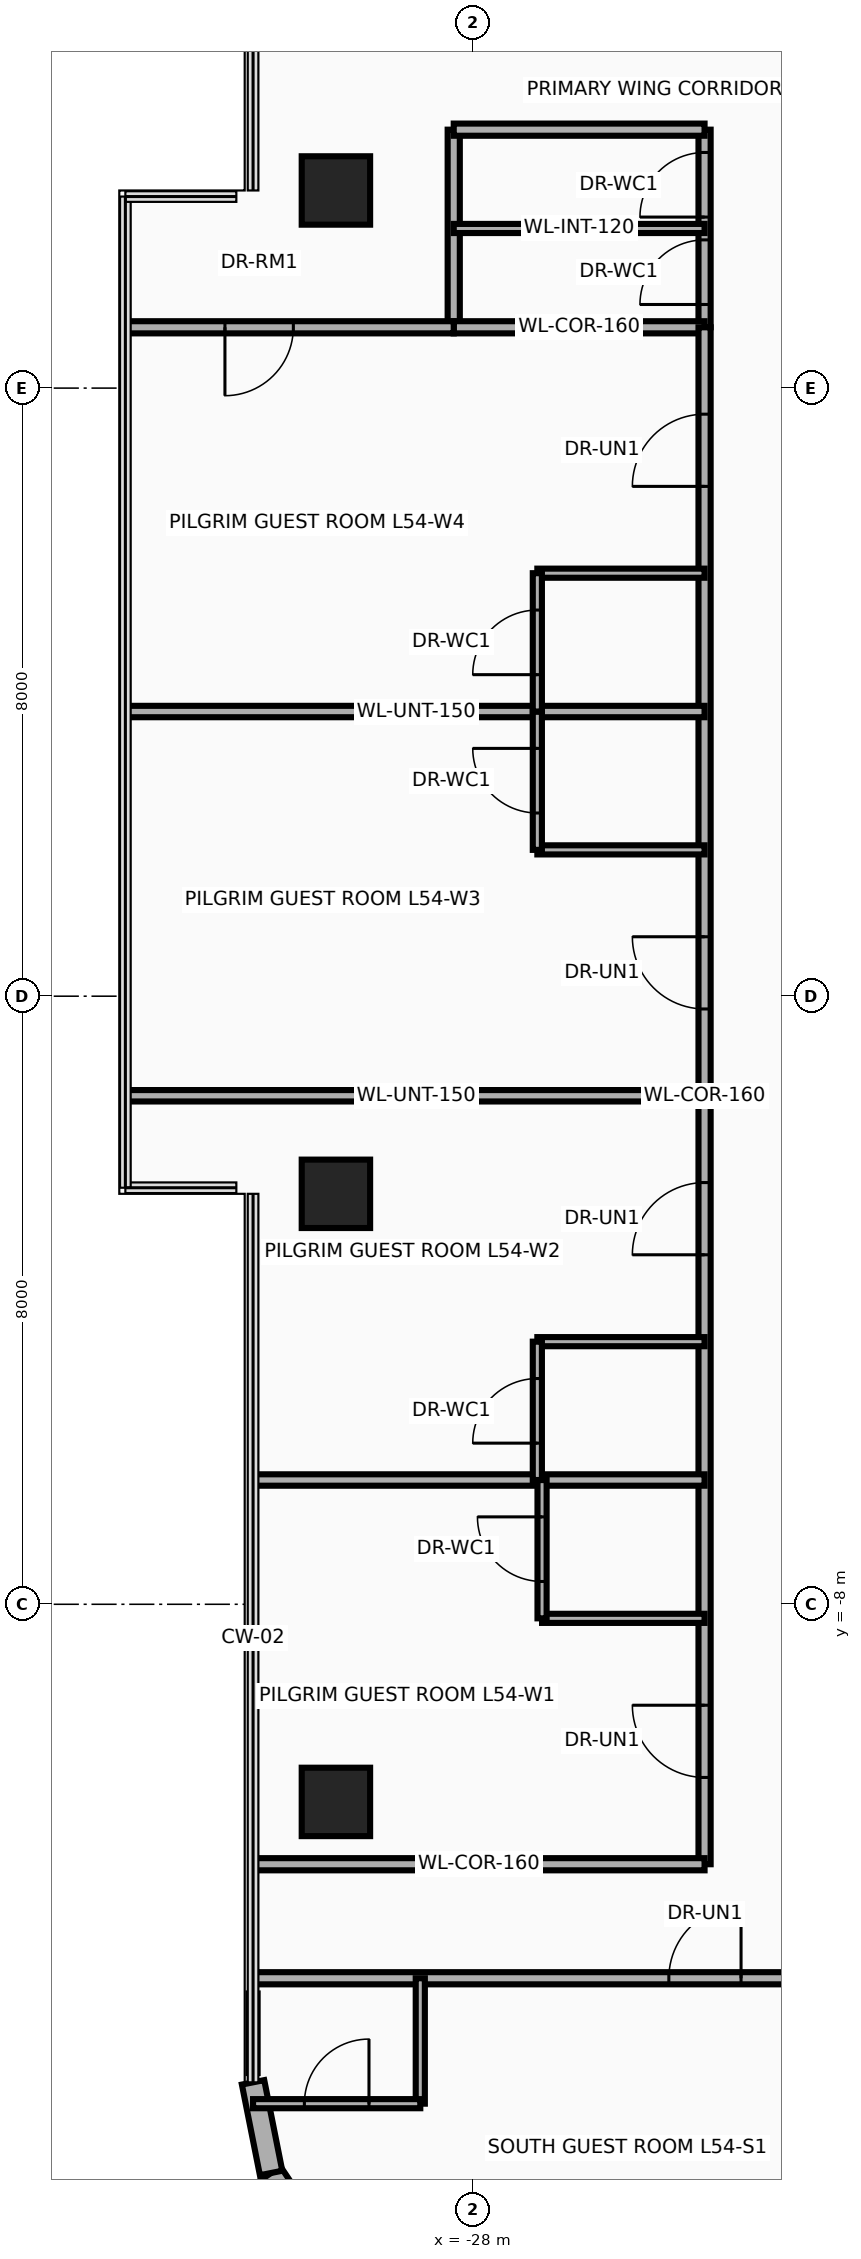
"""IFC4 building model, lengths in metres.
Left out: names, types, materials, properties, quantities, classifications, styles, units other than length and angle.
Written with IfcOpenShell. Run it as: python <this file> out.ifc"""

import sys

from ifc_helpers import new_model, si_unit, direction, frame, frame_2d, origin, origin_2d, place, context, subcontext, project, spatial, rectangle, extrude, source, transform, mapped, element, fill, save


model = new_model("IFC4")
c1 = context("Model", 3, precision=1e-05, world=origin(), true_north=direction((0.0, 1.0)))
c2 = subcontext(c1, "Body", "Model", "MODEL_VIEW")
j1 = project(units=[si_unit("LENGTHUNIT", "METRE"), si_unit("PLANEANGLEUNIT", "RADIAN")], contexts=[c1])
p1 = place(None, origin())
s1 = spatial("IfcSite", under=j1, at=p1, CompositionType="ELEMENT")
p2 = place(p1, origin())
s2 = spatial("IfcBuilding", under=s1, at=p2, CompositionType="ELEMENT")
p3 = place(p2, frame((0.0, 0.0, 212.5)))
s3 = spatial("IfcBuildingStorey", under=s2, at=p3, CompositionType="ELEMENT", Elevation=212.5)
m1 = source(origin(), c2, "Body", "SweptSolid", [
    extrude(rectangle(XDim=0.9, YDim=0.9, at=origin_2d()), origin(), (0.0, 0.0, 1.0), 3.5),
])
for number, where, z_axis, x_axis in (
    (1, (-29.8, -10.6, 0.0), (0.0, 0.0, 1.0), (1.0, 0.0, 0.0)),
    (2, (-29.8, -2.6, 0.0), (0.0, 0.0, 1.0), (1.0, 0.0, 0.0)),
    (3, (-29.8, 10.6, 0.0), (0.0, 0.0, 1.0), (1.0, 0.0, 0.0)),
):
    element("IfcColumn", number, at=place(p3, frame(where, z_axis=z_axis, x_axis=x_axis)), inside=s3, PredefinedType="COLUMN", context=c2, shape_type="MappedRepresentation", body=[
        mapped(m1, transform((0.0, 0.0, 0.0), x_axis=(1.0, 0.0, 0.0), y_axis=(0.0, 1.0, 0.0), z_axis=(0.0, 0.0, 1.0), scale=1.0)),
    ])
p4 = place(p3, frame((-29.983, -16.483, 0.0), z_axis=(0.0, 0.0, 1.0), x_axis=(-0.555635100982, 0.831426265255, 0.0)))
e4 = element("IfcWall", 4, at=p4, inside=s3, PredefinedType="SOLIDWALL", context=c2, shape_type="SweptSolid", body=[
    extrude(rectangle(XDim=1.205, YDim=0.3, at=frame_2d((0.603, 0.0))), origin(), (0.0, 0.0, 1.0), 3.26),
])
p5 = place(p3, frame((-30.653, -15.482, 0.0), z_axis=(0.0, 0.0, 1.0), x_axis=(-0.194996050505, 0.980804027463, 0.0)))
e5 = element("IfcWall", 5, at=p5, inside=s3, PredefinedType="SOLIDWALL", context=c2, shape_type="SweptSolid", body=[
    extrude(rectangle(XDim=1.216, YDim=0.3, at=frame_2d((0.608, 0.0))), origin(), (0.0, 0.0, 1.0), 3.26),
])
p6 = place(p3, frame((-28.25, 8.8, 0.0), z_axis=(0.0, 0.0, 1.0), x_axis=(0.0, 1.0, 0.0)))
e6 = element("IfcWall", 6, at=p6, inside=s3, PredefinedType="PARTITIONING", context=c2, shape_type="SweptSolid", body=[
    extrude(rectangle(XDim=2.6, YDim=0.16, at=frame_2d((1.3, 0.0))), origin(), (0.0, 0.0, 1.0), 2.544),
])
p7 = place(p3, frame((-24.95, 8.8, 0.0), z_axis=(0.0, 0.0, 1.0), x_axis=(0.0, 1.0, 0.0)))
e7 = element("IfcWall", 7, at=p7, inside=s3, PredefinedType="PARTITIONING", context=c2, shape_type="SweptSolid", body=[
    extrude(rectangle(XDim=2.6, YDim=0.16, at=frame_2d((1.3, 0.0))), origin(), (0.0, 0.0, 1.0), 2.544),
])
p8 = place(p7, frame((0.3, 0.0, 0.0)))
e8 = element("IfcOpeningElement", 8, at=p8, cuts=e7, PredefinedType="OPENING", context=c2, shape_type="SweptSolid", body=[
    extrude(rectangle(XDim=0.85, YDim=2.1, at=frame_2d((0.425, 1.05))), frame((0.0, 0.095, 0.0), z_axis=(0.0, -1.0, 0.0), x_axis=(1.0, 0.0, 0.0)), (0.0, 0.0, 1.0), 0.19),
])
p9 = place(p7, frame((1.45, 0.0, 0.0)))
e9 = element("IfcOpeningElement", 9, at=p9, cuts=e7, PredefinedType="OPENING", context=c2, shape_type="SweptSolid", body=[
    extrude(rectangle(XDim=0.85, YDim=2.1, at=frame_2d((0.425, 1.05))), frame((0.0, 0.095, 0.0), z_axis=(0.0, -1.0, 0.0), x_axis=(1.0, 0.0, 0.0)), (0.0, 0.0, 1.0), 0.19),
])
for number, where, z_axis, x_axis in (
    (10, (-28.25, 8.8, 0.0), (0.0, 0.0, 1.0), (1.0, 0.0, 0.0)),
    (11, (-28.25, 11.4, 0.0), (0.0, 0.0, 1.0), (1.0, 0.0, 0.0)),
):
    element("IfcWall", number, at=place(p3, frame(where, z_axis=z_axis, x_axis=x_axis)), inside=s3, PredefinedType="PARTITIONING", context=c2, shape_type="SweptSolid", body=[
        extrude(rectangle(XDim=3.3, YDim=0.16, at=frame_2d((1.65, 0.0))), origin(), (0.0, 0.0, 1.0), 3.26),
    ])
p10 = place(p3, frame((-28.25, 10.1, 0.0), z_axis=(0.0, 0.0, 1.0), x_axis=(1.0, 0.0, 0.0)))
e12 = element("IfcWall", 12, at=p10, inside=s3, PredefinedType="PARTITIONING", context=c2, shape_type="SweptSolid", body=[
    extrude(rectangle(XDim=3.3, YDim=0.12, at=frame_2d((1.65, 0.0))), origin(), (0.0, 0.0, 1.0), 3.26),
])
p11 = place(p3, frame((-24.95, -11.42, 0.0), z_axis=(0.0, 0.0, 1.0), x_axis=(0.0, 1.0, 0.0)))
e13 = element("IfcWall", 13, at=p11, inside=s3, PredefinedType="PARTITIONING", context=c2, shape_type="SweptSolid", body=[
    extrude(rectangle(XDim=20.22, YDim=0.16, at=frame_2d((10.11, 0.0))), origin(), (0.0, 0.0, 1.0), 2.544),
])
p12 = place(p11, frame((1.142, 0.0, 0.0)))
e14 = element("IfcOpeningElement", 14, at=p12, cuts=e13, PredefinedType="OPENING", context=c2, shape_type="SweptSolid", body=[
    extrude(rectangle(XDim=0.95, YDim=2.15, at=frame_2d((0.475, 1.075))), frame((0.0, 0.095, 0.0), z_axis=(0.0, -1.0, 0.0), x_axis=(1.0, 0.0, 0.0)), (0.0, 0.0, 1.0), 0.19),
])
p13 = place(p11, frame((8.018, 0.0, 0.0)))
e15 = element("IfcOpeningElement", 15, at=p13, cuts=e13, PredefinedType="OPENING", context=c2, shape_type="SweptSolid", body=[
    extrude(rectangle(XDim=0.95, YDim=2.15, at=frame_2d((0.475, 1.075))), frame((0.0, 0.095, 0.0), z_axis=(0.0, -1.0, 0.0), x_axis=(1.0, 0.0, 0.0)), (0.0, 0.0, 1.0), 0.19),
])
p14 = place(p11, frame((11.252, 0.0, 0.0)))
e16 = element("IfcOpeningElement", 16, at=p14, cuts=e13, PredefinedType="OPENING", context=c2, shape_type="SweptSolid", body=[
    extrude(rectangle(XDim=0.95, YDim=2.15, at=frame_2d((0.475, 1.075))), frame((0.0, 0.095, 0.0), z_axis=(0.0, -1.0, 0.0), x_axis=(1.0, 0.0, 0.0)), (0.0, 0.0, 1.0), 0.19),
])
p15 = place(p11, frame((18.127, 0.0, 0.0)))
e17 = element("IfcOpeningElement", 17, at=p15, cuts=e13, PredefinedType="OPENING", context=c2, shape_type="SweptSolid", body=[
    extrude(rectangle(XDim=0.95, YDim=2.15, at=frame_2d((0.475, 1.075))), frame((0.0, 0.095, 0.0), z_axis=(0.0, -1.0, 0.0), x_axis=(1.0, 0.0, 0.0)), (0.0, 0.0, 1.0), 0.19),
])
p16 = place(p3, frame((-32.54, 8.8, 0.0), z_axis=(0.0, 0.0, 1.0), x_axis=(1.0, 0.0, 0.0)))
e18 = element("IfcWall", 18, at=p16, inside=s3, PredefinedType="PARTITIONING", context=c2, shape_type="SweptSolid", body=[
    extrude(rectangle(XDim=4.29, YDim=0.16, at=frame_2d((2.145, 0.0))), origin(), (0.0, 0.0, 1.0), 2.706),
])
p17 = place(p16, frame((1.28, 0.0, 0.0)))
e19 = element("IfcOpeningElement", 19, at=p17, cuts=e18, PredefinedType="OPENING", context=c2, shape_type="SweptSolid", body=[
    extrude(rectangle(XDim=0.9, YDim=2.1, at=frame_2d((0.45, 1.05))), frame((0.0, 0.095, 0.0), z_axis=(0.0, -1.0, 0.0), x_axis=(1.0, 0.0, 0.0)), (0.0, 0.0, 1.0), 0.19),
])
p18 = place(p3, frame((-30.89, -6.365, 0.0), z_axis=(0.0, 0.0, 1.0), x_axis=(1.0, 0.0, 0.0)))
e20 = element("IfcWall", 20, at=p18, inside=s3, PredefinedType="PARTITIONING", context=c2, shape_type="SweptSolid", body=[
    extrude(rectangle(XDim=5.94, YDim=0.15, at=frame_2d((2.97, 0.0))), origin(), (0.0, 0.0, 1.0), 2.706),
])
for number, where, z_axis, x_axis in (
    (21, (-32.54, -1.31, 0.0), (0.0, 0.0, 1.0), (1.0, 0.0, 0.0)),
    (22, (-32.54, 3.745, 0.0), (0.0, 0.0, 1.0), (1.0, 0.0, 0.0)),
):
    element("IfcWall", number, at=place(p3, frame(where, z_axis=z_axis, x_axis=x_axis)), inside=s3, PredefinedType="PARTITIONING", context=c2, shape_type="SweptSolid", body=[
        extrude(rectangle(XDim=7.59, YDim=0.15, at=frame_2d((3.795, 0.0))), origin(), (0.0, 0.0, 1.0), 2.706),
    ])
p19 = place(p3, frame((-27.088, -8.185, 0.0), z_axis=(0.0, 0.0, 1.0), x_axis=(1.0, 0.0, 0.0)))
e23 = element("IfcWall", 23, at=p19, inside=s3, PredefinedType="PARTITIONING", context=c2, shape_type="SweptSolid", body=[
    extrude(rectangle(XDim=2.138, YDim=0.12, at=frame_2d((1.069, 0.0))), origin(), (0.0, 0.0, 1.0), 3.26),
])
p20 = place(p3, frame((-27.088, -8.185, 0.0), z_axis=(0.0, 0.0, 1.0), x_axis=(0.0, 1.0, 0.0)))
e24 = element("IfcWall", 24, at=p20, inside=s3, PredefinedType="PARTITIONING", context=c2, shape_type="SweptSolid", body=[
    extrude(rectangle(XDim=1.82, YDim=0.12, at=frame_2d((0.91, 0.0))), origin(), (0.0, 0.0, 1.0), 2.788),
])
p21 = place(p20, frame((0.485, 0.0, 0.0)))
e25 = element("IfcOpeningElement", 25, at=p21, cuts=e24, PredefinedType="OPENING", context=c2, shape_type="SweptSolid", body=[
    extrude(rectangle(XDim=0.85, YDim=2.1, at=frame_2d((0.425, 1.05))), frame((0.0, 0.075, 0.0), z_axis=(0.0, -1.0, 0.0), x_axis=(1.0, 0.0, 0.0)), (0.0, 0.0, 1.0), 0.15),
])
p22 = place(p3, frame((-27.15, -4.545, 0.0), z_axis=(0.0, 0.0, 1.0), x_axis=(1.0, 0.0, 0.0)))
e26 = element("IfcWall", 26, at=p22, inside=s3, PredefinedType="PARTITIONING", context=c2, shape_type="SweptSolid", body=[
    extrude(rectangle(XDim=2.2, YDim=0.12, at=frame_2d((1.1, 0.0))), origin(), (0.0, 0.0, 1.0), 2.788),
])
p23 = place(p3, frame((-27.15, -6.365, 0.0), z_axis=(0.0, 0.0, 1.0), x_axis=(0.0, 1.0, 0.0)))
e27 = element("IfcWall", 27, at=p23, inside=s3, PredefinedType="PARTITIONING", context=c2, shape_type="SweptSolid", body=[
    extrude(rectangle(XDim=1.82, YDim=0.12, at=frame_2d((0.91, 0.0))), origin(), (0.0, 0.0, 1.0), 2.788),
])
p24 = place(p23, frame((0.485, 0.0, 0.0)))
e28 = element("IfcOpeningElement", 28, at=p24, cuts=e27, PredefinedType="OPENING", context=c2, shape_type="SweptSolid", body=[
    extrude(rectangle(XDim=0.85, YDim=2.1, at=frame_2d((0.425, 1.05))), frame((0.0, 0.075, 0.0), z_axis=(0.0, -1.0, 0.0), x_axis=(1.0, 0.0, 0.0)), (0.0, 0.0, 1.0), 0.15),
])
p25 = place(p3, frame((-27.15, 1.925, 0.0), z_axis=(0.0, 0.0, 1.0), x_axis=(1.0, 0.0, 0.0)))
e29 = element("IfcWall", 29, at=p25, inside=s3, PredefinedType="PARTITIONING", context=c2, shape_type="SweptSolid", body=[
    extrude(rectangle(XDim=2.2, YDim=0.12, at=frame_2d((1.1, 0.0))), origin(), (0.0, 0.0, 1.0), 3.26),
])
p26 = place(p3, frame((-27.15, 1.925, 0.0), z_axis=(0.0, 0.0, 1.0), x_axis=(0.0, 1.0, 0.0)))
e30 = element("IfcWall", 30, at=p26, inside=s3, PredefinedType="PARTITIONING", context=c2, shape_type="SweptSolid", body=[
    extrude(rectangle(XDim=1.82, YDim=0.12, at=frame_2d((0.91, 0.0))), origin(), (0.0, 0.0, 1.0), 2.788),
])
p27 = place(p26, frame((0.485, 0.0, 0.0)))
e31 = element("IfcOpeningElement", 31, at=p27, cuts=e30, PredefinedType="OPENING", context=c2, shape_type="SweptSolid", body=[
    extrude(rectangle(XDim=0.85, YDim=2.1, at=frame_2d((0.425, 1.05))), frame((0.0, 0.075, 0.0), z_axis=(0.0, -1.0, 0.0), x_axis=(1.0, 0.0, 0.0)), (0.0, 0.0, 1.0), 0.15),
])
p28 = place(p3, frame((-27.15, 5.565, 0.0), z_axis=(0.0, 0.0, 1.0), x_axis=(1.0, 0.0, 0.0)))
e32 = element("IfcWall", 32, at=p28, inside=s3, PredefinedType="PARTITIONING", context=c2, shape_type="SweptSolid", body=[
    extrude(rectangle(XDim=2.2, YDim=0.12, at=frame_2d((1.1, 0.0))), origin(), (0.0, 0.0, 1.0), 3.26),
])
p29 = place(p3, frame((-27.15, 3.745, 0.0), z_axis=(0.0, 0.0, 1.0), x_axis=(0.0, 1.0, 0.0)))
e33 = element("IfcWall", 33, at=p29, inside=s3, PredefinedType="PARTITIONING", context=c2, shape_type="SweptSolid", body=[
    extrude(rectangle(XDim=1.82, YDim=0.12, at=frame_2d((0.91, 0.0))), origin(), (0.0, 0.0, 1.0), 2.788),
])
p30 = place(p29, frame((0.485, 0.0, 0.0)))
e34 = element("IfcOpeningElement", 34, at=p30, cuts=e33, PredefinedType="OPENING", context=c2, shape_type="SweptSolid", body=[
    extrude(rectangle(XDim=0.85, YDim=2.1, at=frame_2d((0.425, 1.05))), frame((0.0, 0.075, 0.0), z_axis=(0.0, -1.0, 0.0), x_axis=(1.0, 0.0, 0.0)), (0.0, 0.0, 1.0), 0.15),
])
p31 = place(p3, frame((-30.89, -12.92, 0.0), z_axis=(0.0, 0.0, 1.0), x_axis=(1.0, 0.0, 0.0)))
e35 = element("IfcWall", 35, at=p31, inside=s3, PredefinedType="PARTITIONING", context=c2, shape_type="SweptSolid", body=[
    extrude(rectangle(XDim=21.28, YDim=0.16, at=frame_2d((10.64, 0.0))), origin(), (0.0, 0.0, 1.0), 2.634),
])
p32 = place(p31, frame((5.47, 0.0, 0.0)))
e36 = element("IfcOpeningElement", 36, at=p32, cuts=e35, PredefinedType="OPENING", context=c2, shape_type="SweptSolid", body=[
    extrude(rectangle(XDim=0.95, YDim=2.15, at=frame_2d((0.475, 1.075))), frame((0.0, 0.095, 0.0), z_axis=(0.0, -1.0, 0.0), x_axis=(1.0, 0.0, 0.0)), (0.0, 0.0, 1.0), 0.19),
])
p33 = place(p31, frame((15.01, 0.0, 0.0)))
e37 = element("IfcOpeningElement", 37, at=p33, cuts=e35, PredefinedType="OPENING", context=c2, shape_type="SweptSolid", body=[
    extrude(rectangle(XDim=0.95, YDim=2.15, at=frame_2d((0.475, 1.075))), frame((0.0, 0.095, 0.0), z_axis=(0.0, -1.0, 0.0), x_axis=(1.0, 0.0, 0.0)), (0.0, 0.0, 1.0), 0.19),
])
p34 = place(p3, frame((-28.69, -14.57, 0.0), z_axis=(0.0, 0.0, 1.0), x_axis=(0.0, 1.0, 0.0)))
e38 = element("IfcWall", 38, at=p34, inside=s3, PredefinedType="PARTITIONING", context=c2, shape_type="SweptSolid", body=[
    extrude(rectangle(XDim=1.65, YDim=0.12, at=frame_2d((0.825, 0.0))), origin(), (0.0, 0.0, 1.0), 3.26),
])
p35 = place(p3, frame((-30.89, -14.57, 0.0), z_axis=(0.0, 0.0, 1.0), x_axis=(1.0, 0.0, 0.0)))
e39 = element("IfcWall", 39, at=p35, inside=s3, PredefinedType="PARTITIONING", context=c2, shape_type="SweptSolid", body=[
    extrude(rectangle(XDim=2.2, YDim=0.12, at=frame_2d((1.1, 0.0))), origin(), (0.0, 0.0, 1.0), 3.26),
])
p36 = place(p35, frame((0.675, 0.0, 0.0)))
e40 = element("IfcOpeningElement", 40, at=p36, cuts=e39, PredefinedType="OPENING", context=c2, shape_type="SweptSolid", body=[
    extrude(rectangle(XDim=0.85, YDim=2.1, at=frame_2d((0.425, 1.05))), frame((0.0, 0.075, 0.0), z_axis=(0.0, -1.0, 0.0), x_axis=(1.0, 0.0, 0.0)), (0.0, 0.0, 1.0), 0.15),
])
p37 = place(p3, frame((-30.89, -14.167, 0.0), z_axis=(0.0, 0.0, 1.0), x_axis=(0.0, 1.0, 0.0)))
e41 = element("IfcWall", 41, at=p37, inside=s3, PredefinedType="PARTITIONING", context=c2, shape_type="SweptSolid", body=[
    extrude(rectangle(XDim=1.047, YDim=0.12, at=frame_2d((0.523, 0.0))), origin(), (0.0, 0.0, 1.0), 3.26),
])
p38 = place(p3, frame((-30.89, -11.42, 0.0), z_axis=(0.0, 0.0, 1.0), x_axis=(1.0, 0.0, 0.0)))
e42 = element("IfcWall", 42, at=p38, inside=s3, PredefinedType="PARTITIONING", context=c2, shape_type="SweptSolid", body=[
    extrude(rectangle(XDim=5.94, YDim=0.16, at=frame_2d((2.97, 0.0))), origin(), (0.0, 0.0, 1.0), 3.26),
])
p39 = place(p8, origin())
e43 = element("IfcDoor", 43, at=p39, inside=s3, OperationType="SINGLE_SWING_LEFT", PredefinedType="DOOR", context=c2, shape_type="SweptSolid", body=[
    extrude(rectangle(XDim=0.85, YDim=2.1, at=frame_2d((0.425, 1.05))), frame((0.0, 0.025, 0.0), z_axis=(0.0, -1.0, 0.0), x_axis=(1.0, 0.0, 0.0)), (0.0, 0.0, 1.0), 0.05),
])
fill(e8, e43)
p40 = place(p9, origin())
e44 = element("IfcDoor", 44, at=p40, inside=s3, OperationType="SINGLE_SWING_RIGHT", PredefinedType="DOOR", context=c2, shape_type="SweptSolid", body=[
    extrude(rectangle(XDim=0.85, YDim=2.1, at=frame_2d((0.425, 1.05))), frame((0.0, 0.025, 0.0), z_axis=(0.0, -1.0, 0.0), x_axis=(1.0, 0.0, 0.0)), (0.0, 0.0, 1.0), 0.05),
])
fill(e9, e44)
p41 = place(p17, frame((0.9, 0.0, 0.0), z_axis=(0.0, 0.0, 1.0), x_axis=(-1.0, 0.0, 0.0)))
e45 = element("IfcDoor", 45, at=p41, inside=s3, OperationType="SINGLE_SWING_LEFT", PredefinedType="DOOR", context=c2, shape_type="SweptSolid", body=[
    extrude(rectangle(XDim=0.9, YDim=2.1, at=frame_2d((0.45, 1.05))), frame((0.0, 0.025, 0.0), z_axis=(0.0, -1.0, 0.0), x_axis=(1.0, 0.0, 0.0)), (0.0, 0.0, 1.0), 0.05),
])
fill(e19, e45)
p42 = place(p12, origin())
e46 = element("IfcDoor", 46, at=p42, inside=s3, OperationType="SINGLE_SWING_RIGHT", PredefinedType="DOOR", context=c2, shape_type="SweptSolid", body=[
    extrude(rectangle(XDim=0.95, YDim=2.15, at=frame_2d((0.475, 1.075))), frame((0.0, 0.025, 0.0), z_axis=(0.0, -1.0, 0.0), x_axis=(1.0, 0.0, 0.0)), (0.0, 0.0, 1.0), 0.05),
])
fill(e14, e46)
p43 = place(p21, origin())
e47 = element("IfcDoor", 47, at=p43, inside=s3, OperationType="SINGLE_SWING_LEFT", PredefinedType="DOOR", context=c2, shape_type="SweptSolid", body=[
    extrude(rectangle(XDim=0.85, YDim=2.1, at=frame_2d((0.425, 1.05))), frame((0.0, 0.025, 0.0), z_axis=(0.0, -1.0, 0.0), x_axis=(1.0, 0.0, 0.0)), (0.0, 0.0, 1.0), 0.05),
])
fill(e25, e47)
p44 = place(p13, origin())
e48 = element("IfcDoor", 48, at=p44, inside=s3, OperationType="SINGLE_SWING_RIGHT", PredefinedType="DOOR", context=c2, shape_type="SweptSolid", body=[
    extrude(rectangle(XDim=0.95, YDim=2.15, at=frame_2d((0.475, 1.075))), frame((0.0, 0.025, 0.0), z_axis=(0.0, -1.0, 0.0), x_axis=(1.0, 0.0, 0.0)), (0.0, 0.0, 1.0), 0.05),
])
fill(e15, e48)
p45 = place(p24, origin())
e49 = element("IfcDoor", 49, at=p45, inside=s3, OperationType="SINGLE_SWING_LEFT", PredefinedType="DOOR", context=c2, shape_type="SweptSolid", body=[
    extrude(rectangle(XDim=0.85, YDim=2.1, at=frame_2d((0.425, 1.05))), frame((0.0, 0.025, 0.0), z_axis=(0.0, -1.0, 0.0), x_axis=(1.0, 0.0, 0.0)), (0.0, 0.0, 1.0), 0.05),
])
fill(e28, e49)
p46 = place(p14, origin())
e50 = element("IfcDoor", 50, at=p46, inside=s3, OperationType="SINGLE_SWING_RIGHT", PredefinedType="DOOR", context=c2, shape_type="SweptSolid", body=[
    extrude(rectangle(XDim=0.95, YDim=2.15, at=frame_2d((0.475, 1.075))), frame((0.0, 0.025, 0.0), z_axis=(0.0, -1.0, 0.0), x_axis=(1.0, 0.0, 0.0)), (0.0, 0.0, 1.0), 0.05),
])
fill(e16, e50)
p47 = place(p27, origin())
e51 = element("IfcDoor", 51, at=p47, inside=s3, OperationType="SINGLE_SWING_LEFT", PredefinedType="DOOR", context=c2, shape_type="SweptSolid", body=[
    extrude(rectangle(XDim=0.85, YDim=2.1, at=frame_2d((0.425, 1.05))), frame((0.0, 0.025, 0.0), z_axis=(0.0, -1.0, 0.0), x_axis=(1.0, 0.0, 0.0)), (0.0, 0.0, 1.0), 0.05),
])
fill(e31, e51)
p48 = place(p15, origin())
e52 = element("IfcDoor", 52, at=p48, inside=s3, OperationType="SINGLE_SWING_RIGHT", PredefinedType="DOOR", context=c2, shape_type="SweptSolid", body=[
    extrude(rectangle(XDim=0.95, YDim=2.15, at=frame_2d((0.475, 1.075))), frame((0.0, 0.025, 0.0), z_axis=(0.0, -1.0, 0.0), x_axis=(1.0, 0.0, 0.0)), (0.0, 0.0, 1.0), 0.05),
])
fill(e17, e52)
p49 = place(p30, origin())
e53 = element("IfcDoor", 53, at=p49, inside=s3, OperationType="SINGLE_SWING_LEFT", PredefinedType="DOOR", context=c2, shape_type="SweptSolid", body=[
    extrude(rectangle(XDim=0.85, YDim=2.1, at=frame_2d((0.425, 1.05))), frame((0.0, 0.025, 0.0), z_axis=(0.0, -1.0, 0.0), x_axis=(1.0, 0.0, 0.0)), (0.0, 0.0, 1.0), 0.05),
])
fill(e34, e53)
p50 = place(p32, origin())
e54 = element("IfcDoor", 54, at=p50, inside=s3, OperationType="SINGLE_SWING_RIGHT", PredefinedType="DOOR", context=c2, shape_type="SweptSolid", body=[
    extrude(rectangle(XDim=0.95, YDim=2.15, at=frame_2d((0.475, 1.075))), frame((0.0, 0.025, 0.0), z_axis=(0.0, -1.0, 0.0), x_axis=(1.0, 0.0, 0.0)), (0.0, 0.0, 1.0), 0.05),
])
fill(e36, e54)
p51 = place(p36, origin())
e55 = element("IfcDoor", 55, at=p51, inside=s3, OperationType="SINGLE_SWING_LEFT", PredefinedType="DOOR", context=c2, shape_type="SweptSolid", body=[
    extrude(rectangle(XDim=0.85, YDim=2.1, at=frame_2d((0.425, 1.05))), frame((0.0, 0.025, 0.0), z_axis=(0.0, -1.0, 0.0), x_axis=(1.0, 0.0, 0.0)), (0.0, 0.0, 1.0), 0.05),
])
fill(e40, e55)
save(model, sys.argv[1])
